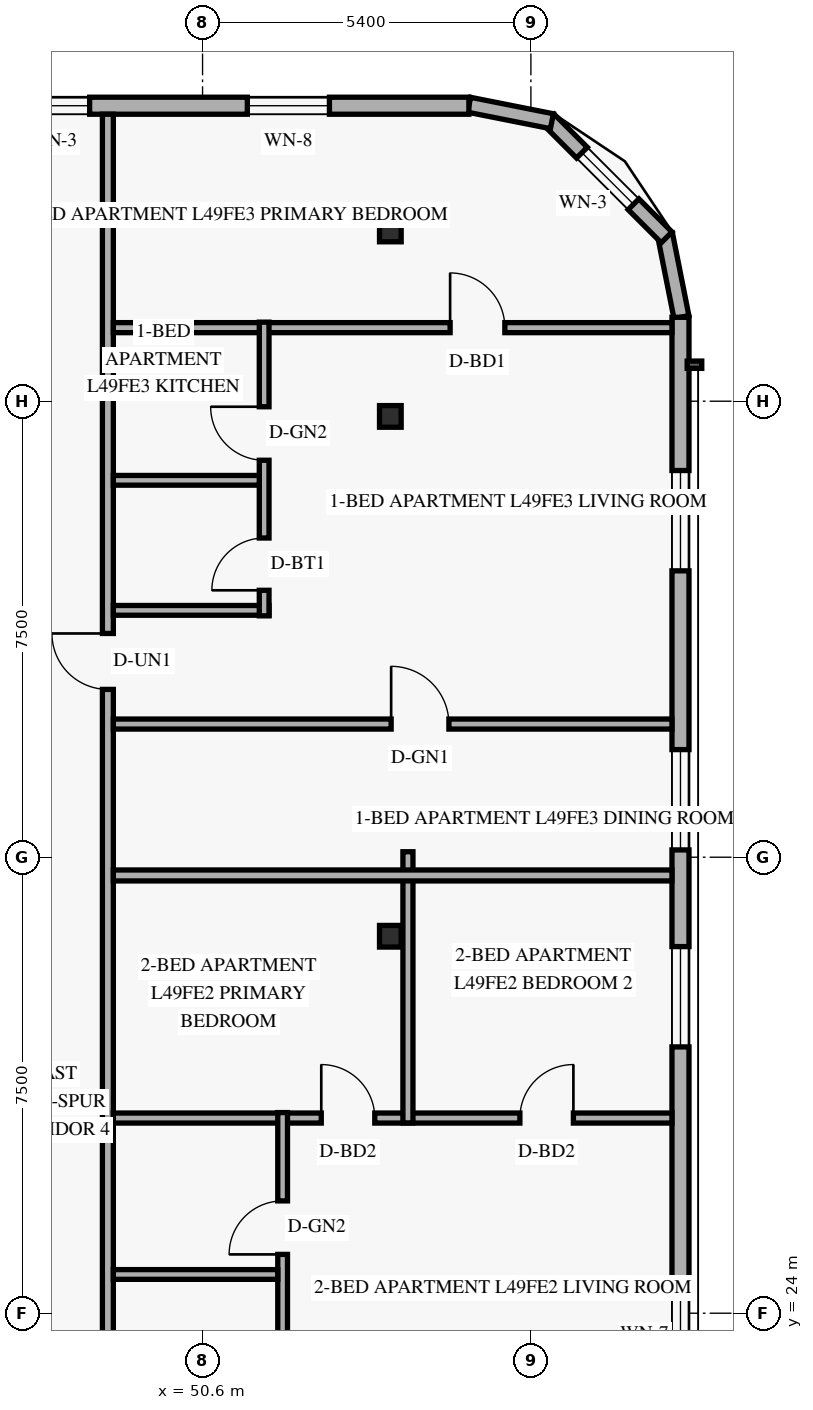
"""IFC4 building model, lengths in metres.
Left out: names, types, materials, properties, quantities, classifications, styles, units other than length and angle.
Written with IfcOpenShell. Run it as: python <this file> out.ifc"""

import sys

from ifc_helpers import new_model, si_unit, direction, frame, frame_2d, origin, origin_2d, place, context, subcontext, project, spatial, rectangle, hollow_rectangle, extrude, element, fill, save


model = new_model("IFC4")
c1 = context("Model", 3, precision=1e-05, world=origin(), true_north=direction((0.0, 1.0)))
c2 = subcontext(c1, "Body", "Model", "MODEL_VIEW")
j1 = project(units=[si_unit("LENGTHUNIT", "METRE"), si_unit("PLANEANGLEUNIT", "RADIAN")], contexts=[c1])
p1 = place(None, origin())
s1 = spatial("IfcSite", under=j1, at=p1, CompositionType="ELEMENT")
p2 = place(p1, origin())
s2 = spatial("IfcBuilding", under=s1, at=p2, CompositionType="ELEMENT")
p3 = place(p2, frame((0.0, 0.0, 188.4)))
s3 = spatial("IfcBuildingStorey", under=s2, at=p3, CompositionType="ELEMENT", Elevation=188.4)
for number, where, z_axis, x_axis in (
    (1, (53.584, 30.2, 0.0), (0.058, 0.0, 0.998), (0.0, 1.0, 0.0)),
    (2, (53.584, 38.75, 0.0), (0.058, 0.0, 0.998), (0.0, 1.0, 0.0)),
    (3, (53.584, 41.8, 0.0), (0.058, 0.0, 0.998), (0.0, 1.0, 0.0)),
):
    element("IfcColumn", number, at=place(p3, frame(where, z_axis=z_axis, x_axis=x_axis)), inside=s3, PredefinedType="COLUMN", context=c2, shape_type="SweptSolid", body=[
        extrude(hollow_rectangle(XDim=0.356, YDim=0.356, WallThickness=0.016, at=origin_2d()), origin(), (0.0, 0.0, 1.0), 3.606),
    ])
p4 = place(p3, frame((58.476, 40.384, 0.0), z_axis=(0.0, 0.0, 1.0), x_axis=(-0.19496651342, 0.980809899341, 0.0)))
e4 = element("IfcWall", 4, at=p4, inside=s3, PredefinedType="SOLIDWALL", context=c2, shape_type="SweptSolid", body=[
    extrude(rectangle(XDim=1.389, YDim=0.25, at=frame_2d((0.694, 0.0))), origin(), (0.0, 0.0, 1.0), 3.35),
])
p5 = place(p3, frame((58.232, 41.695, 0.0), z_axis=(0.0, 0.0, 1.0), x_axis=(-0.707106781187, 0.707106781187, 0.0)))
e5 = element("IfcWall", 5, at=p5, inside=s3, PredefinedType="SOLIDWALL", context=c2, shape_type="SweptSolid", body=[
    extrude(rectangle(XDim=2.739, YDim=0.25, at=frame_2d((1.37, 0.0))), origin(), (0.0, 0.0, 1.0), 3.35),
])
p6 = place(p5, frame((0.77, 0.0, 0.85)))
e6 = element("IfcOpeningElement", 6, at=p6, cuts=e5, PredefinedType="OPENING", context=c2, shape_type="SweptSolid", body=[
    extrude(rectangle(XDim=1.2, YDim=1.5, at=frame_2d((0.6, 0.75))), frame((0.0, 0.135, 0.0), z_axis=(0.0, -1.0, 0.0), x_axis=(1.0, 0.0, 0.0)), (0.0, 0.0, 1.0), 0.27),
])
p7 = place(p3, frame((56.345, 43.605, 0.0), z_axis=(0.0, 0.0, 1.0), x_axis=(-0.980809899341, 0.19496651342, 0.0)))
e7 = element("IfcWall", 7, at=p7, inside=s3, PredefinedType="SOLIDWALL", context=c2, shape_type="SweptSolid", body=[
    extrude(rectangle(XDim=1.389, YDim=0.25, at=frame_2d((0.694, 0.0))), origin(), (0.0, 0.0, 1.0), 3.35),
])
p8 = place(p3, frame((58.46, 7.62, 0.0), z_axis=(0.0, 0.0, 1.0), x_axis=(0.0, 1.0, 0.0)))
e8 = element("IfcWall", 8, at=p8, inside=s3, PredefinedType="SOLIDWALL", context=c2, shape_type="SweptSolid", body=[
    extrude(rectangle(XDim=32.76, YDim=0.28, at=frame_2d((16.38, 0.0))), origin(), (0.0, 0.0, 1.0), 3.35),
])
p9 = place(p8, frame((2.92, 0.0, 0.85)))
e9 = element("IfcOpeningElement", 9, at=p9, cuts=e8, PredefinedType="OPENING", context=c2, shape_type="SweptSolid", body=[
    extrude(rectangle(XDim=1.65, YDim=1.6, at=frame_2d((0.825, 0.8))), frame((0.0, 0.15, 0.0), z_axis=(0.0, -1.0, 0.0), x_axis=(1.0, 0.0, 0.0)), (0.0, 0.0, 1.0), 0.3),
])
p10 = place(p8, frame((7.91, 0.0, 0.85)))
e10 = element("IfcOpeningElement", 10, at=p10, cuts=e8, PredefinedType="OPENING", context=c2, shape_type="SweptSolid", body=[
    extrude(rectangle(XDim=1.65, YDim=1.6, at=frame_2d((0.825, 0.8))), frame((0.0, 0.15, 0.0), z_axis=(0.0, -1.0, 0.0), x_axis=(1.0, 0.0, 0.0)), (0.0, 0.0, 1.0), 0.3),
])
p11 = place(p8, frame((10.4, 0.0, 0.85)))
e11 = element("IfcOpeningElement", 11, at=p11, cuts=e8, PredefinedType="OPENING", context=c2, shape_type="SweptSolid", body=[
    extrude(rectangle(XDim=1.65, YDim=1.6, at=frame_2d((0.825, 0.8))), frame((0.0, 0.15, 0.0), z_axis=(0.0, -1.0, 0.0), x_axis=(1.0, 0.0, 0.0)), (0.0, 0.0, 1.0), 0.3),
])
p12 = place(p8, frame((15.205, 0.0, 0.85)))
e12 = element("IfcOpeningElement", 12, at=p12, cuts=e8, PredefinedType="OPENING", context=c2, shape_type="SweptSolid", body=[
    extrude(rectangle(XDim=1.65, YDim=1.6, at=frame_2d((0.825, 0.8))), frame((0.0, 0.15, 0.0), z_axis=(0.0, -1.0, 0.0), x_axis=(1.0, 0.0, 0.0)), (0.0, 0.0, 1.0), 0.3),
])
p13 = place(p8, frame((20.76, 0.0, 0.85)))
e13 = element("IfcOpeningElement", 13, at=p13, cuts=e8, PredefinedType="OPENING", context=c2, shape_type="SweptSolid", body=[
    extrude(rectangle(XDim=1.65, YDim=1.6, at=frame_2d((0.825, 0.8))), frame((0.0, 0.15, 0.0), z_axis=(0.0, -1.0, 0.0), x_axis=(1.0, 0.0, 0.0)), (0.0, 0.0, 1.0), 0.3),
])
p14 = place(p8, frame((24.0, 0.0, 0.85)))
e14 = element("IfcOpeningElement", 14, at=p14, cuts=e8, PredefinedType="OPENING", context=c2, shape_type="SweptSolid", body=[
    extrude(rectangle(XDim=1.65, YDim=1.6, at=frame_2d((0.825, 0.8))), frame((0.0, 0.15, 0.0), z_axis=(0.0, -1.0, 0.0), x_axis=(1.0, 0.0, 0.0)), (0.0, 0.0, 1.0), 0.3),
])
p15 = place(p8, frame((28.59, 0.0, 0.85)))
e15 = element("IfcOpeningElement", 15, at=p15, cuts=e8, PredefinedType="OPENING", context=c2, shape_type="SweptSolid", body=[
    extrude(rectangle(XDim=1.65, YDim=1.6, at=frame_2d((0.825, 0.8))), frame((0.0, 0.15, 0.0), z_axis=(0.0, -1.0, 0.0), x_axis=(1.0, 0.0, 0.0)), (0.0, 0.0, 1.0), 0.3),
])
p16 = place(p3, frame((54.98, 43.86, 0.0), z_axis=(0.0, 0.0, 1.0), x_axis=(-1.0, 0.0, 0.0)))
e16 = element("IfcWall", 16, at=p16, inside=s3, PredefinedType="SOLIDWALL", context=c2, shape_type="SweptSolid", body=[
    extrude(rectangle(XDim=33.76, YDim=0.28, at=frame_2d((16.88, 0.0))), origin(), (0.0, 0.0, 1.0), 3.35),
])
p17 = place(p16, frame((28.705, 0.0, 0.85)))
e17 = element("IfcOpeningElement", 17, at=p17, cuts=e16, PredefinedType="OPENING", context=c2, shape_type="SweptSolid", body=[
    extrude(rectangle(XDim=1.35, YDim=1.55, at=frame_2d((0.675, 0.775))), frame((0.0, 0.15, 0.0), z_axis=(0.0, -1.0, 0.0), x_axis=(1.0, 0.0, 0.0)), (0.0, 0.0, 1.0), 0.3),
])
p18 = place(p16, frame((21.82, 0.0, 0.85)))
e18 = element("IfcOpeningElement", 18, at=p18, cuts=e16, PredefinedType="OPENING", context=c2, shape_type="SweptSolid", body=[
    extrude(rectangle(XDim=1.35, YDim=1.55, at=frame_2d((0.675, 0.775))), frame((0.0, 0.15, 0.0), z_axis=(0.0, -1.0, 0.0), x_axis=(1.0, 0.0, 0.0)), (0.0, 0.0, 1.0), 0.3),
])
p19 = place(p16, frame((15.043, 0.0, 0.85)))
e19 = element("IfcOpeningElement", 19, at=p19, cuts=e16, PredefinedType="OPENING", context=c2, shape_type="SweptSolid", body=[
    extrude(rectangle(XDim=1.35, YDim=1.55, at=frame_2d((0.675, 0.775))), frame((0.0, 0.15, 0.0), z_axis=(0.0, -1.0, 0.0), x_axis=(1.0, 0.0, 0.0)), (0.0, 0.0, 1.0), 0.3),
])
p20 = place(p16, frame((9.132, 0.0, 0.85)))
e20 = element("IfcOpeningElement", 20, at=p20, cuts=e16, PredefinedType="OPENING", context=c2, shape_type="SweptSolid", body=[
    extrude(rectangle(XDim=1.35, YDim=1.55, at=frame_2d((0.675, 0.775))), frame((0.0, 0.15, 0.0), z_axis=(0.0, -1.0, 0.0), x_axis=(1.0, 0.0, 0.0)), (0.0, 0.0, 1.0), 0.3),
])
p21 = place(p16, frame((6.237, 0.0, 0.85)))
e21 = element("IfcOpeningElement", 21, at=p21, cuts=e16, PredefinedType="OPENING", context=c2, shape_type="SweptSolid", body=[
    extrude(rectangle(XDim=1.2, YDim=1.5, at=frame_2d((0.6, 0.75))), frame((0.0, 0.15, 0.0), z_axis=(0.0, -1.0, 0.0), x_axis=(1.0, 0.0, 0.0)), (0.0, 0.0, 1.0), 0.3),
])
p22 = place(p16, frame((2.293, 0.0, 0.85)))
e22 = element("IfcOpeningElement", 22, at=p22, cuts=e16, PredefinedType="OPENING", context=c2, shape_type="SweptSolid", body=[
    extrude(rectangle(XDim=1.35, YDim=1.55, at=frame_2d((0.675, 0.775))), frame((0.0, 0.15, 0.0), z_axis=(0.0, -1.0, 0.0), x_axis=(1.0, 0.0, 0.0)), (0.0, 0.0, 1.0), 0.3),
])
p23 = place(p3, frame((49.043, 4.28, 0.0), z_axis=(0.0, 0.0, 1.0), x_axis=(0.0, 1.0, 0.0)))
e23 = element("IfcWall", 23, at=p23, inside=s3, PredefinedType="STANDARD", context=c2, shape_type="SweptSolid", body=[
    extrude(rectangle(XDim=39.44, YDim=0.18, at=frame_2d((19.72, 0.0))), origin(), (0.0, 0.0, 1.0), 2.72),
])
p24 = place(p23, frame((8.605, 0.0, 0.0)))
e24 = element("IfcOpeningElement", 24, at=p24, cuts=e23, PredefinedType="OPENING", context=c2, shape_type="SweptSolid", body=[
    extrude(rectangle(XDim=0.92, YDim=2.15, at=frame_2d((0.46, 1.075))), frame((0.0, 0.1, 0.0), z_axis=(0.0, -1.0, 0.0), x_axis=(1.0, 0.0, 0.0)), (0.0, 0.0, 1.0), 0.2),
])
p25 = place(p23, frame((16.866, 0.0, 0.0)))
e25 = element("IfcOpeningElement", 25, at=p25, cuts=e23, PredefinedType="OPENING", context=c2, shape_type="SweptSolid", body=[
    extrude(rectangle(XDim=0.92, YDim=2.15, at=frame_2d((0.46, 1.075))), frame((0.0, 0.1, 0.0), z_axis=(0.0, -1.0, 0.0), x_axis=(1.0, 0.0, 0.0)), (0.0, 0.0, 1.0), 0.2),
])
p26 = place(p23, frame((29.98, 0.0, 0.0)))
e26 = element("IfcOpeningElement", 26, at=p26, cuts=e23, PredefinedType="OPENING", context=c2, shape_type="SweptSolid", body=[
    extrude(rectangle(XDim=0.92, YDim=2.15, at=frame_2d((0.46, 1.075))), frame((0.0, 0.1, 0.0), z_axis=(0.0, -1.0, 0.0), x_axis=(1.0, 0.0, 0.0)), (0.0, 0.0, 1.0), 0.2),
])
p27 = place(p3, frame((49.133, 27.21, 0.0), z_axis=(0.0, 0.0, 1.0), x_axis=(1.0, 0.0, 0.0)))
e27 = element("IfcWall", 27, at=p27, inside=s3, PredefinedType="PARTITIONING", context=c2, shape_type="SweptSolid", body=[
    extrude(rectangle(XDim=9.187, YDim=0.165, at=frame_2d((4.594, 0.0))), origin(), (0.0, 0.0, 1.0), 2.869),
])
p28 = place(p27, frame((3.419, 0.0, 0.0)))
e28 = element("IfcOpeningElement", 28, at=p28, cuts=e27, PredefinedType="OPENING", context=c2, shape_type="SweptSolid", body=[
    extrude(rectangle(XDim=0.88, YDim=2.14, at=frame_2d((0.44, 1.07))), frame((0.0, 0.093, 0.0), z_axis=(0.0, -1.0, 0.0), x_axis=(1.0, 0.0, 0.0)), (0.0, 0.0, 1.0), 0.185),
])
p29 = place(p27, frame((6.686, 0.0, 0.0)))
e29 = element("IfcOpeningElement", 29, at=p29, cuts=e27, PredefinedType="OPENING", context=c2, shape_type="SweptSolid", body=[
    extrude(rectangle(XDim=0.88, YDim=2.14, at=frame_2d((0.44, 1.07))), frame((0.0, 0.093, 0.0), z_axis=(0.0, -1.0, 0.0), x_axis=(1.0, 0.0, 0.0)), (0.0, 0.0, 1.0), 0.185),
])
p30 = place(p3, frame((51.917, 22.356, 0.0), z_axis=(0.0, 0.0, 1.0), x_axis=(0.0, 1.0, 0.0)))
e30 = element("IfcWall", 30, at=p30, inside=s3, PredefinedType="PLUMBINGWALL", context=c2, shape_type="SweptSolid", body=[
    extrude(rectangle(XDim=4.944, YDim=0.16, at=frame_2d((2.472, 0.0))), origin(), (0.0, 0.0, 1.0), 3.35),
])
p31 = place(p30, frame((0.42, 0.0, 0.0)))
e31 = element("IfcOpeningElement", 31, at=p31, cuts=e30, PredefinedType="OPENING", context=c2, shape_type="SweptSolid", body=[
    extrude(rectangle(XDim=0.86, YDim=2.12, at=frame_2d((0.43, 1.06))), frame((0.0, 0.09, 0.0), z_axis=(0.0, -1.0, 0.0), x_axis=(1.0, 0.0, 0.0)), (0.0, 0.0, 1.0), 0.18),
])
p32 = place(p30, frame((2.611, 0.0, 0.0)))
e32 = element("IfcOpeningElement", 32, at=p32, cuts=e30, PredefinedType="OPENING", context=c2, shape_type="SweptSolid", body=[
    extrude(rectangle(XDim=0.88, YDim=2.12, at=frame_2d((0.44, 1.06))), frame((0.0, 0.09, 0.0), z_axis=(0.0, -1.0, 0.0), x_axis=(1.0, 0.0, 0.0)), (0.0, 0.0, 1.0), 0.18),
])
p33 = place(p3, frame((49.133, 24.637, 0.0), z_axis=(0.0, 0.0, 1.0), x_axis=(1.0, 0.0, 0.0)))
e33 = element("IfcWall", 33, at=p33, inside=s3, PredefinedType="PLUMBINGWALL", context=c2, shape_type="SweptSolid", body=[
    extrude(rectangle(XDim=2.704, YDim=0.16, at=frame_2d((1.352, 0.0))), origin(), (0.0, 0.0, 1.0), 3.35),
])
p34 = place(p3, frame((53.978, 27.13, 0.0), z_axis=(0.0, 0.0, 1.0), x_axis=(0.0, 1.0, 0.0)))
e34 = element("IfcWall", 34, at=p34, inside=s3, PredefinedType="PARTITIONING", context=c2, shape_type="SweptSolid", body=[
    extrude(rectangle(XDim=4.46, YDim=0.165, at=frame_2d((2.23, 0.0))), origin(), (0.0, 0.0, 1.0), 3.35),
])
p35 = place(p3, frame((49.133, 31.2, 0.0), z_axis=(0.0, 0.0, 1.0), x_axis=(1.0, 0.0, 0.0)))
e35 = element("IfcWall", 35, at=p35, inside=s3, PredefinedType="PARTITIONING", context=c2, shape_type="SweptSolid", body=[
    extrude(rectangle(XDim=9.187, YDim=0.18, at=frame_2d((4.594, 0.0))), origin(), (0.0, 0.0, 1.0), 2.869),
])
p36 = place(p3, frame((49.133, 40.21, 0.0), z_axis=(0.0, 0.0, 1.0), x_axis=(1.0, 0.0, 0.0)))
e36 = element("IfcWall", 36, at=p36, inside=s3, PredefinedType="PARTITIONING", context=c2, shape_type="SweptSolid", body=[
    extrude(rectangle(XDim=9.187, YDim=0.165, at=frame_2d((4.594, 0.0))), origin(), (0.0, 0.0, 1.0), 2.869),
])
p37 = place(p36, frame((5.539, 0.0, 0.0)))
e37 = element("IfcOpeningElement", 37, at=p37, cuts=e36, PredefinedType="OPENING", context=c2, shape_type="SweptSolid", body=[
    extrude(rectangle(XDim=0.9, YDim=2.14, at=frame_2d((0.45, 1.07))), frame((0.0, 0.093, 0.0), z_axis=(0.0, -1.0, 0.0), x_axis=(1.0, 0.0, 0.0)), (0.0, 0.0, 1.0), 0.185),
])
p38 = place(p3, frame((49.133, 35.56, 0.0), z_axis=(0.0, 0.0, 1.0), x_axis=(1.0, 0.0, 0.0)))
e38 = element("IfcWall", 38, at=p38, inside=s3, PredefinedType="PLUMBINGWALL", context=c2, shape_type="SweptSolid", body=[
    extrude(rectangle(XDim=2.56, YDim=0.16, at=frame_2d((1.28, 0.0))), origin(), (0.0, 0.0, 1.0), 3.35),
])
p39 = place(p3, frame((51.613, 35.47, 0.0), z_axis=(0.0, 0.0, 1.0), x_axis=(0.0, 1.0, 0.0)))
e39 = element("IfcWall", 39, at=p39, inside=s3, PredefinedType="PLUMBINGWALL", context=c2, shape_type="SweptSolid", body=[
    extrude(rectangle(XDim=4.83, YDim=0.16, at=frame_2d((2.415, 0.0))), origin(), (0.0, 0.0, 1.0), 2.72),
])
p40 = place(p39, frame((0.42, 0.0, 0.0)))
e40 = element("IfcOpeningElement", 40, at=p40, cuts=e39, PredefinedType="OPENING", context=c2, shape_type="SweptSolid", body=[
    extrude(rectangle(XDim=0.86, YDim=2.12, at=frame_2d((0.43, 1.06))), frame((0.0, 0.09, 0.0), z_axis=(0.0, -1.0, 0.0), x_axis=(1.0, 0.0, 0.0)), (0.0, 0.0, 1.0), 0.18),
])
p41 = place(p39, frame((2.559, 0.0, 0.0)))
e41 = element("IfcOpeningElement", 41, at=p41, cuts=e39, PredefinedType="OPENING", context=c2, shape_type="SweptSolid", body=[
    extrude(rectangle(XDim=0.88, YDim=2.12, at=frame_2d((0.44, 1.06))), frame((0.0, 0.09, 0.0), z_axis=(0.0, -1.0, 0.0), x_axis=(1.0, 0.0, 0.0)), (0.0, 0.0, 1.0), 0.18),
])
p42 = place(p3, frame((49.133, 37.699, 0.0), z_axis=(0.0, 0.0, 1.0), x_axis=(1.0, 0.0, 0.0)))
e42 = element("IfcWall", 42, at=p42, inside=s3, PredefinedType="PLUMBINGWALL", context=c2, shape_type="SweptSolid", body=[
    extrude(rectangle(XDim=2.4, YDim=0.16, at=frame_2d((1.2, 0.0))), origin(), (0.0, 0.0, 1.0), 3.35),
])
p43 = place(p3, frame((49.133, 33.69, 0.0), z_axis=(0.0, 0.0, 1.0), x_axis=(1.0, 0.0, 0.0)))
e43 = element("IfcWall", 43, at=p43, inside=s3, PredefinedType="PARTITIONING", context=c2, shape_type="SweptSolid", body=[
    extrude(rectangle(XDim=9.187, YDim=0.165, at=frame_2d((4.594, 0.0))), origin(), (0.0, 0.0, 1.0), 2.869),
])
p44 = place(p43, frame((4.569, 0.0, 0.0)))
e44 = element("IfcOpeningElement", 44, at=p44, cuts=e43, PredefinedType="OPENING", context=c2, shape_type="SweptSolid", body=[
    extrude(rectangle(XDim=0.95, YDim=2.15, at=frame_2d((0.475, 1.075))), frame((0.0, 0.093, 0.0), z_axis=(0.0, -1.0, 0.0), x_axis=(1.0, 0.0, 0.0)), (0.0, 0.0, 1.0), 0.185),
])
p45 = place(p6, origin())
e45 = element("IfcWindow", 45, at=p45, inside=s3, PartitioningType="SINGLE_PANEL", PredefinedType="WINDOW", context=c2, shape_type="SweptSolid", body=[
    extrude(rectangle(XDim=1.2, YDim=1.5, at=frame_2d((0.6, 0.75))), frame((0.0, 0.03, 0.0), z_axis=(0.0, -1.0, 0.0), x_axis=(1.0, 0.0, 0.0)), (0.0, 0.0, 1.0), 0.06),
])
fill(e6, e45)
p46 = place(p12, origin())
e46 = element("IfcWindow", 46, at=p46, inside=s3, PartitioningType="SINGLE_PANEL", PredefinedType="WINDOW", context=c2, shape_type="SweptSolid", body=[
    extrude(rectangle(XDim=1.65, YDim=1.6, at=frame_2d((0.825, 0.8))), frame((0.0, 0.03, 0.0), z_axis=(0.0, -1.0, 0.0), x_axis=(1.0, 0.0, 0.0)), (0.0, 0.0, 1.0), 0.06),
])
fill(e12, e46)
p47 = place(p13, origin())
e47 = element("IfcWindow", 47, at=p47, inside=s3, PartitioningType="SINGLE_PANEL", PredefinedType="WINDOW", context=c2, shape_type="SweptSolid", body=[
    extrude(rectangle(XDim=1.65, YDim=1.6, at=frame_2d((0.825, 0.8))), frame((0.0, 0.03, 0.0), z_axis=(0.0, -1.0, 0.0), x_axis=(1.0, 0.0, 0.0)), (0.0, 0.0, 1.0), 0.06),
])
fill(e13, e47)
p48 = place(p14, origin())
e48 = element("IfcWindow", 48, at=p48, inside=s3, PartitioningType="SINGLE_PANEL", PredefinedType="WINDOW", context=c2, shape_type="SweptSolid", body=[
    extrude(rectangle(XDim=1.65, YDim=1.6, at=frame_2d((0.825, 0.8))), frame((0.0, 0.03, 0.0), z_axis=(0.0, -1.0, 0.0), x_axis=(1.0, 0.0, 0.0)), (0.0, 0.0, 1.0), 0.06),
])
fill(e14, e48)
p49 = place(p15, origin())
e49 = element("IfcWindow", 49, at=p49, inside=s3, PartitioningType="SINGLE_PANEL", PredefinedType="WINDOW", context=c2, shape_type="SweptSolid", body=[
    extrude(rectangle(XDim=1.65, YDim=1.6, at=frame_2d((0.825, 0.8))), frame((0.0, 0.03, 0.0), z_axis=(0.0, -1.0, 0.0), x_axis=(1.0, 0.0, 0.0)), (0.0, 0.0, 1.0), 0.06),
])
fill(e15, e49)
p50 = place(p21, origin())
e50 = element("IfcWindow", 50, at=p50, inside=s3, PartitioningType="SINGLE_PANEL", PredefinedType="WINDOW", context=c2, shape_type="SweptSolid", body=[
    extrude(rectangle(XDim=1.2, YDim=1.5, at=frame_2d((0.6, 0.75))), frame((0.0, 0.03, 0.0), z_axis=(0.0, -1.0, 0.0), x_axis=(1.0, 0.0, 0.0)), (0.0, 0.0, 1.0), 0.06),
])
fill(e21, e50)
p51 = place(p22, origin())
e51 = element("IfcWindow", 51, at=p51, inside=s3, PartitioningType="SINGLE_PANEL", PredefinedType="WINDOW", context=c2, shape_type="SweptSolid", body=[
    extrude(rectangle(XDim=1.35, YDim=1.55, at=frame_2d((0.675, 0.775))), frame((0.0, 0.03, 0.0), z_axis=(0.0, -1.0, 0.0), x_axis=(1.0, 0.0, 0.0)), (0.0, 0.0, 1.0), 0.06),
])
fill(e22, e51)
p52 = place(p32, origin())
e52 = element("IfcDoor", 52, at=p52, inside=s3, OperationType="SINGLE_SWING_LEFT", PredefinedType="DOOR", context=c2, shape_type="SweptSolid", body=[
    extrude(rectangle(XDim=0.88, YDim=2.12, at=frame_2d((0.44, 1.06))), frame((0.0, 0.025, 0.0), z_axis=(0.0, -1.0, 0.0), x_axis=(1.0, 0.0, 0.0)), (0.0, 0.0, 1.0), 0.05),
])
fill(e32, e52)
p53 = place(p28, origin())
e53 = element("IfcDoor", 53, at=p53, inside=s3, OperationType="SINGLE_SWING_LEFT", PredefinedType="DOOR", context=c2, shape_type="SweptSolid", body=[
    extrude(rectangle(XDim=0.88, YDim=2.14, at=frame_2d((0.44, 1.07))), frame((0.0, 0.025, 0.0), z_axis=(0.0, -1.0, 0.0), x_axis=(1.0, 0.0, 0.0)), (0.0, 0.0, 1.0), 0.05),
])
fill(e28, e53)
p54 = place(p29, origin())
e54 = element("IfcDoor", 54, at=p54, inside=s3, OperationType="SINGLE_SWING_RIGHT", PredefinedType="DOOR", context=c2, shape_type="SweptSolid", body=[
    extrude(rectangle(XDim=0.88, YDim=2.14, at=frame_2d((0.44, 1.07))), frame((0.0, 0.025, 0.0), z_axis=(0.0, -1.0, 0.0), x_axis=(1.0, 0.0, 0.0)), (0.0, 0.0, 1.0), 0.05),
])
fill(e29, e54)
p55 = place(p44, origin())
e55 = element("IfcDoor", 55, at=p55, inside=s3, OperationType="SINGLE_SWING_LEFT", PredefinedType="DOOR", context=c2, shape_type="SweptSolid", body=[
    extrude(rectangle(XDim=0.95, YDim=2.15, at=frame_2d((0.475, 1.075))), frame((0.0, 0.025, 0.0), z_axis=(0.0, -1.0, 0.0), x_axis=(1.0, 0.0, 0.0)), (0.0, 0.0, 1.0), 0.05),
])
fill(e44, e55)
p56 = place(p26, origin())
e56 = element("IfcDoor", 56, at=p56, inside=s3, OperationType="SINGLE_SWING_RIGHT", PredefinedType="DOOR", context=c2, shape_type="SweptSolid", body=[
    extrude(rectangle(XDim=0.92, YDim=2.15, at=frame_2d((0.46, 1.075))), frame((0.0, 0.025, 0.0), z_axis=(0.0, -1.0, 0.0), x_axis=(1.0, 0.0, 0.0)), (0.0, 0.0, 1.0), 0.05),
])
fill(e26, e56)
p57 = place(p40, origin())
e57 = element("IfcDoor", 57, at=p57, inside=s3, OperationType="SINGLE_SWING_LEFT", PredefinedType="DOOR", context=c2, shape_type="SweptSolid", body=[
    extrude(rectangle(XDim=0.86, YDim=2.12, at=frame_2d((0.43, 1.06))), frame((0.0, 0.025, 0.0), z_axis=(0.0, -1.0, 0.0), x_axis=(1.0, 0.0, 0.0)), (0.0, 0.0, 1.0), 0.05),
])
fill(e40, e57)
p58 = place(p41, origin())
e58 = element("IfcDoor", 58, at=p58, inside=s3, OperationType="SINGLE_SWING_RIGHT", PredefinedType="DOOR", context=c2, shape_type="SweptSolid", body=[
    extrude(rectangle(XDim=0.88, YDim=2.12, at=frame_2d((0.44, 1.06))), frame((0.0, 0.025, 0.0), z_axis=(0.0, -1.0, 0.0), x_axis=(1.0, 0.0, 0.0)), (0.0, 0.0, 1.0), 0.05),
])
fill(e41, e58)
p59 = place(p37, origin())
e59 = element("IfcDoor", 59, at=p59, inside=s3, OperationType="SINGLE_SWING_LEFT", PredefinedType="DOOR", context=c2, shape_type="SweptSolid", body=[
    extrude(rectangle(XDim=0.9, YDim=2.14, at=frame_2d((0.45, 1.07))), frame((0.0, 0.025, 0.0), z_axis=(0.0, -1.0, 0.0), x_axis=(1.0, 0.0, 0.0)), (0.0, 0.0, 1.0), 0.05),
])
fill(e37, e59)
save(model, sys.argv[1])
